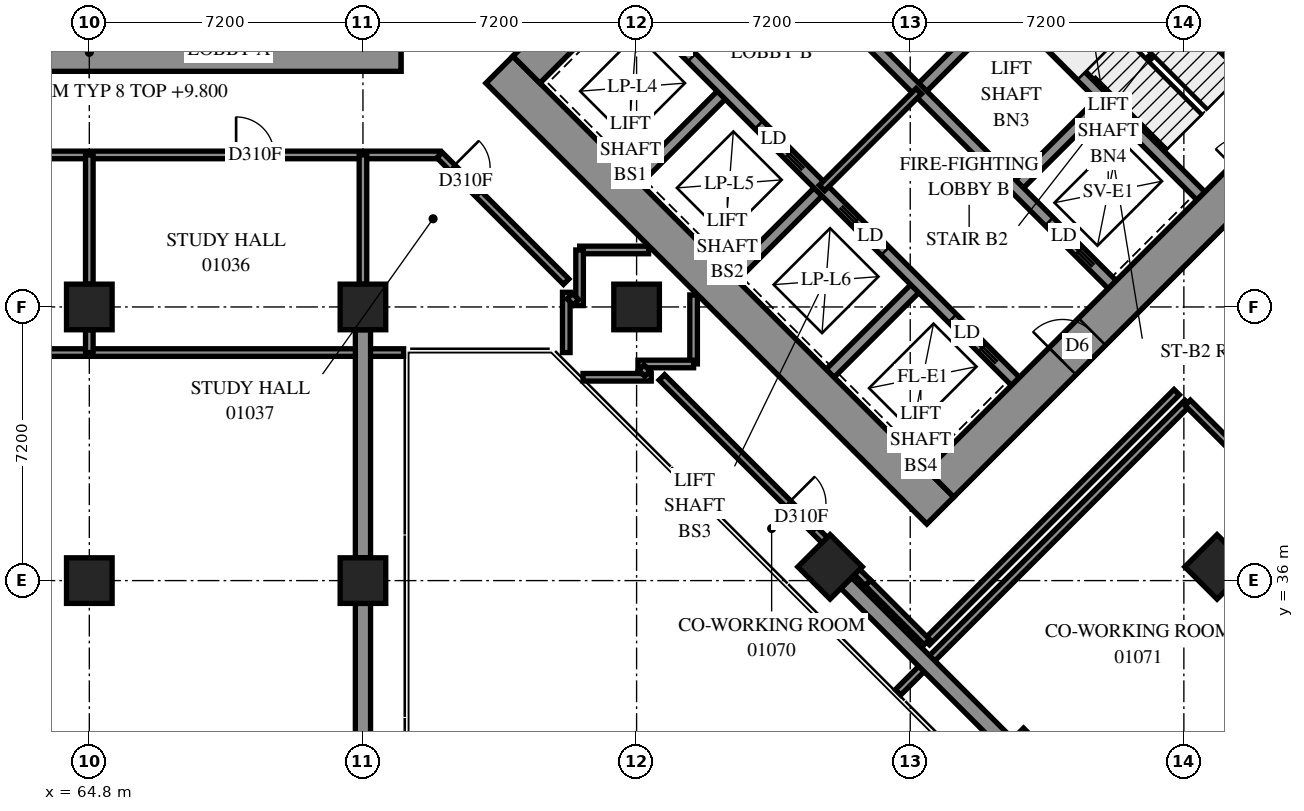
"""IFC4 building model, lengths in metres.
Left out: names, types, materials, properties, quantities, classifications, styles, units other than length and angle.
Written with IfcOpenShell. Run it as: python <this file> out.ifc"""

import sys

from ifc_helpers import new_model, si_unit, direction, frame, frame_2d, origin, origin_2d, place, context, subcontext, project, spatial, rectangle, extrude, element, fill, save


model = new_model("IFC4")
c1 = context("Model", 3, precision=1e-05, world=origin(), true_north=direction((0.0, 1.0)))
c2 = subcontext(c1, "Body", "Model", "MODEL_VIEW")
j1 = project(units=[si_unit("LENGTHUNIT", "METRE"), si_unit("PLANEANGLEUNIT", "RADIAN")], contexts=[c1])
p1 = place(None, origin())
s1 = spatial("IfcSite", under=j1, at=p1, CompositionType="ELEMENT")
p2 = place(p1, origin())
s2 = spatial("IfcBuilding", under=s1, at=p2, CompositionType="ELEMENT")
p3 = place(p2, frame((0.0, 0.0, 6.0)))
s3 = spatial("IfcBuildingStorey", under=s2, at=p3, CompositionType="ELEMENT", Elevation=6.0)
for number, where, z_axis, x_axis in (
    (1, (64.8, 36.0, 0.0), (0.0, 0.0, 1.0), (1.0, 0.0, 0.0)),
    (2, (64.8, 43.2, 0.0), (0.0, 0.0, 1.0), (1.0, 0.0, 0.0)),
    (3, (72.0, 36.0, 0.0), (0.0, 0.0, 1.0), (1.0, 0.0, 0.0)),
    (4, (72.0, 43.2, 0.0), (0.0, 0.0, 1.0), (1.0, 0.0, 0.0)),
    (5, (79.2, 43.2, 0.0), (0.0, 0.0, 1.0), (1.0, 0.0, 0.0)),
    (6, (84.291, 36.362, 0.0), (0.0, 0.0, 1.0), (0.707, -0.707, 0.0)),
    (7, (94.474, 36.362, 0.0), (0.0, 0.0, 1.0), (0.707, -0.707, 0.0)),
    (8, (89.382, 31.271, 0.0), (0.0, 0.0, 1.0), (0.707, -0.707, 0.0)),
):
    element("IfcColumn", number, at=place(p3, frame(where, z_axis=z_axis, x_axis=x_axis)), inside=s3, PredefinedType="COLUMN", context=c2, shape_type="SweptSolid", body=[
        extrude(rectangle(XDim=1.2, YDim=1.2, at=origin_2d()), origin(), (0.0, 0.0, 1.0), 3.8),
    ])
for number, where, z_axis, x_axis in (
    (9, (56.6, 49.9, -0.4), (0.0, 0.0, 1.0), (1.0, 0.0, 0.0)),
    (10, (75.594, 49.443, -0.4), (0.0, 0.0, 1.0), (0.707, -0.707, 0.0)),
):
    element("IfcWall", number, at=place(p3, frame(where, z_axis=z_axis, x_axis=x_axis)), inside=s3, PredefinedType="SHEAR", context=c2, shape_type="SweptSolid", body=[
        extrude(rectangle(XDim=16.4, YDim=1.0, at=frame_2d((8.2, 0.0))), origin(), (0.0, 0.0, 1.0), 3.5),
    ])
p4 = place(p3, frame((86.483, 60.333, -0.4), z_axis=(0.0, 0.0, 1.0), x_axis=(0.70710983, -0.7071037324, 0.0)))
e11 = element("IfcWall", 11, at=p4, inside=s3, PredefinedType="SHEAR", context=c2, shape_type="SweptSolid", body=[
    extrude(rectangle(XDim=16.4, YDim=1.0, at=frame_2d((8.2, 0.0))), origin(), (0.0, 0.0, 1.0), 3.5),
])
p5 = place(p4, frame((11.0, 0.0, 0.4)))
e12 = element("IfcOpeningElement", 12, at=p5, cuts=e11, PredefinedType="OPENING", context=c2, shape_type="SweptSolid", body=[
    extrude(rectangle(XDim=0.8, YDim=2.1, at=frame_2d((0.4, 1.05))), frame((0.0, 0.51, 0.0), z_axis=(0.0, -1.0, 0.0), x_axis=(1.0, 0.0, 0.0)), (0.0, 0.0, 1.0), 1.02),
])
p6 = place(p3, frame((76.301, 49.443, -0.4), z_axis=(0.0, 0.0, 1.0), x_axis=(0.7071067812, 0.7071067812, 0.0)))
e13 = element("IfcWall", 13, at=p6, inside=s3, PredefinedType="SHEAR", context=c2, shape_type="SweptSolid", body=[
    extrude(rectangle(XDim=14.4, YDim=1.0, at=frame_2d((7.2, 0.0))), origin(), (0.0, 0.0, 1.0), 3.5),
])
p7 = place(p6, frame((4.55, 0.0, 0.4)))
e14 = element("IfcOpeningElement", 14, at=p7, cuts=e13, PredefinedType="OPENING", context=c2, shape_type="SweptSolid", body=[
    extrude(rectangle(XDim=1.1, YDim=2.1, at=frame_2d((0.55, 1.05))), frame((0.0, 0.51, 0.0), z_axis=(0.0, -1.0, 0.0), x_axis=(1.0, 0.0, 0.0)), (0.0, 0.0, 1.0), 1.02),
])
p8 = place(p6, frame((11.35, 0.0, 0.4)))
e15 = element("IfcOpeningElement", 15, at=p8, cuts=e13, PredefinedType="OPENING", context=c2, shape_type="SweptSolid", body=[
    extrude(rectangle(XDim=1.1, YDim=2.1, at=frame_2d((0.55, 1.05))), frame((0.0, 0.51, 0.0), z_axis=(0.0, -1.0, 0.0), x_axis=(1.0, 0.0, 0.0)), (0.0, 0.0, 1.0), 1.02),
])
p9 = place(p3, frame((87.19, 38.554, -0.4), z_axis=(0.0, 0.0, 1.0), x_axis=(0.707103309, 0.7071102534, 0.0)))
e16 = element("IfcWall", 16, at=p9, inside=s3, PredefinedType="SHEAR", context=c2, shape_type="SweptSolid", body=[
    extrude(rectangle(XDim=14.4, YDim=1.0, at=frame_2d((7.2, 0.0))), origin(), (0.0, 0.0, 1.0), 3.5),
])
p10 = place(p9, frame((4.55, 0.0, 0.4)))
e17 = element("IfcOpeningElement", 17, at=p10, cuts=e16, PredefinedType="OPENING", context=c2, shape_type="SweptSolid", body=[
    extrude(rectangle(XDim=1.1, YDim=2.1, at=frame_2d((0.55, 1.05))), frame((0.0, 0.51, 0.0), z_axis=(0.0, -1.0, 0.0), x_axis=(1.0, 0.0, 0.0)), (0.0, 0.0, 1.0), 1.02),
])
p11 = place(p9, frame((11.35, 0.0, 0.4)))
e18 = element("IfcOpeningElement", 18, at=p11, cuts=e16, PredefinedType="OPENING", context=c2, shape_type="SweptSolid", body=[
    extrude(rectangle(XDim=1.1, YDim=2.1, at=frame_2d((0.55, 1.05))), frame((0.0, 0.51, 0.0), z_axis=(0.0, -1.0, 0.0), x_axis=(1.0, 0.0, 0.0)), (0.0, 0.0, 1.0), 1.02),
])
p12 = place(p3, frame((79.2, 46.544, 0.0), z_axis=(0.0, 0.0, 1.0), x_axis=(0.7071219326, 0.7070916295, 0.0)))
e19 = element("IfcWall", 19, at=p12, inside=s3, PredefinedType="SOLIDWALL", context=c2, shape_type="SweptSolid", body=[
    extrude(rectangle(XDim=3.3, YDim=0.3, at=frame_2d((1.65, 0.0))), origin(), (0.0, 0.0, 1.0), 3.8),
])
p13 = place(p3, frame((81.746, 43.999, 0.0), z_axis=(0.0, 0.0, 1.0), x_axis=(0.7071067812, 0.7071067812, 0.0)))
e20 = element("IfcWall", 20, at=p13, inside=s3, PredefinedType="SOLIDWALL", context=c2, shape_type="SweptSolid", body=[
    extrude(rectangle(XDim=3.3, YDim=0.3, at=frame_2d((1.65, 0.0))), origin(), (0.0, 0.0, 1.0), 3.8),
])
p14 = place(p3, frame((86.625, 48.878, 0.0), z_axis=(0.0, 0.0, 1.0), x_axis=(0.7071067812, 0.7071067812, 0.0)))
e21 = element("IfcWall", 21, at=p14, inside=s3, PredefinedType="SOLIDWALL", context=c2, shape_type="SweptSolid", body=[
    extrude(rectangle(XDim=3.3, YDim=0.3, at=frame_2d((1.65, 0.0))), origin(), (0.0, 0.0, 1.0), 3.8),
])
p15 = place(p3, frame((84.291, 41.453, 0.0), z_axis=(0.0, 0.0, 1.0), x_axis=(0.7071067812, 0.7071067812, 0.0)))
e22 = element("IfcWall", 22, at=p15, inside=s3, PredefinedType="SOLIDWALL", context=c2, shape_type="SweptSolid", body=[
    extrude(rectangle(XDim=3.3, YDim=0.3, at=frame_2d((1.65, 0.0))), origin(), (0.0, 0.0, 1.0), 3.8),
])
p16 = place(p3, frame((89.17, 46.332, 0.0), z_axis=(0.0, 0.0, 1.0), x_axis=(0.7071067812, 0.7071067812, 0.0)))
e23 = element("IfcWall", 23, at=p16, inside=s3, PredefinedType="SOLIDWALL", context=c2, shape_type="SweptSolid", body=[
    extrude(rectangle(XDim=3.3, YDim=0.3, at=frame_2d((1.65, 0.0))), origin(), (0.0, 0.0, 1.0), 3.8),
])
p17 = place(p3, frame((78.988, 51.423, 0.0), z_axis=(0.0, 0.0, 1.0), x_axis=(0.7071067812, -0.7071067812, 0.0)))
e24 = element("IfcWall", 24, at=p17, inside=s3, PredefinedType="SOLIDWALL", context=c2, shape_type="SweptSolid", body=[
    extrude(rectangle(XDim=14.4, YDim=0.3, at=frame_2d((7.2, 0.0))), origin(), (0.0, 0.0, 1.0), 3.8),
])
p18 = place(p17, frame((1.25, 0.0, 0.0)))
e25 = element("IfcOpeningElement", 25, at=p18, cuts=e24, PredefinedType="OPENING", context=c2, shape_type="SweptSolid", body=[
    extrude(rectangle(XDim=1.1, YDim=2.1, at=frame_2d((0.55, 1.05))), frame((0.0, 0.16, 0.0), z_axis=(0.0, -1.0, 0.0), x_axis=(1.0, 0.0, 0.0)), (0.0, 0.0, 1.0), 0.32),
])
p19 = place(p17, frame((4.85, 0.0, 0.0)))
e26 = element("IfcOpeningElement", 26, at=p19, cuts=e24, PredefinedType="OPENING", context=c2, shape_type="SweptSolid", body=[
    extrude(rectangle(XDim=1.1, YDim=2.1, at=frame_2d((0.55, 1.05))), frame((0.0, 0.16, 0.0), z_axis=(0.0, -1.0, 0.0), x_axis=(1.0, 0.0, 0.0)), (0.0, 0.0, 1.0), 0.32),
])
p20 = place(p17, frame((8.45, 0.0, 0.0)))
e27 = element("IfcOpeningElement", 27, at=p20, cuts=e24, PredefinedType="OPENING", context=c2, shape_type="SweptSolid", body=[
    extrude(rectangle(XDim=1.1, YDim=2.1, at=frame_2d((0.55, 1.05))), frame((0.0, 0.16, 0.0), z_axis=(0.0, -1.0, 0.0), x_axis=(1.0, 0.0, 0.0)), (0.0, 0.0, 1.0), 0.32),
])
p21 = place(p17, frame((12.05, 0.0, 0.0)))
e28 = element("IfcOpeningElement", 28, at=p21, cuts=e24, PredefinedType="OPENING", context=c2, shape_type="SweptSolid", body=[
    extrude(rectangle(XDim=1.1, YDim=2.1, at=frame_2d((0.55, 1.05))), frame((0.0, 0.16, 0.0), z_axis=(0.0, -1.0, 0.0), x_axis=(1.0, 0.0, 0.0)), (0.0, 0.0, 1.0), 0.32),
])
p22 = place(p3, frame((81.534, 53.969, 0.0), z_axis=(0.0, 0.0, 1.0), x_axis=(0.707103309, -0.7071102534, 0.0)))
e29 = element("IfcWall", 29, at=p22, inside=s3, PredefinedType="SOLIDWALL", context=c2, shape_type="SweptSolid", body=[
    extrude(rectangle(XDim=14.4, YDim=0.3, at=frame_2d((7.2, 0.0))), origin(), (0.0, 0.0, 1.0), 3.8),
])
p23 = place(p22, frame((12.05, 0.0, 0.0)))
e30 = element("IfcOpeningElement", 30, at=p23, cuts=e29, PredefinedType="OPENING", context=c2, shape_type="SweptSolid", body=[
    extrude(rectangle(XDim=1.1, YDim=2.1, at=frame_2d((0.55, 1.05))), frame((0.0, 0.16, 0.0), z_axis=(0.0, -1.0, 0.0), x_axis=(1.0, 0.0, 0.0)), (0.0, 0.0, 1.0), 0.32),
])
p24 = place(p3, frame((88.958, 51.211, 0.0), z_axis=(0.0, 0.0, 1.0), x_axis=(0.7070998367, -0.7071137256, 0.0)))
e31 = element("IfcWall", 31, at=p24, inside=s3, PredefinedType="SOLIDWALL", context=c2, shape_type="SweptSolid", body=[
    extrude(rectangle(XDim=7.2, YDim=0.3, at=frame_2d((3.6, 0.0))), origin(), (0.0, 0.0, 1.0), 3.8),
])
p25 = place(p3, frame((91.313, 53.354, 0.0), z_axis=(0.0, 0.0, 1.0), x_axis=(0.7071147811, -0.7070987812, 0.0)))
e32 = element("IfcWall", 32, at=p25, inside=s3, PredefinedType="PARTITIONING", context=c2, shape_type="SweptSolid", body=[
    extrude(rectangle(XDim=6.25, YDim=0.15, at=frame_2d((3.125, 0.0))), origin(), (0.0, 0.0, 1.0), 3.8),
])
p26 = place(p3, frame((84.079, 46.332, 0.0), z_axis=(0.0, 0.0, 1.0), x_axis=(0.7071067812, 0.7071067812, 0.0)))
e33 = element("IfcWall", 33, at=p26, inside=s3, PredefinedType="PARTITIONING", context=c2, shape_type="SweptSolid", body=[
    extrude(rectangle(XDim=3.6, YDim=0.2, at=frame_2d((1.8, 0.0))), origin(), (0.0, 0.0, 1.0), 3.8),
])
p27 = place(p3, frame((13.33, 42.0, 0.0), z_axis=(0.0, 0.0, 1.0), x_axis=(1.0, 0.0, 0.0)))
e34 = element("IfcWall", 34, at=p27, inside=s3, PredefinedType="PARTITIONING", context=c2, shape_type="SweptSolid", body=[
    extrude(rectangle(XDim=59.74, YDim=0.2, at=frame_2d((29.87, 0.0))), origin(), (0.0, 0.0, 1.0), 3.8),
])
p28 = place(p3, frame((54.4, 47.2, 0.0), z_axis=(0.0, 0.0, 1.0), x_axis=(1.0, 0.0, 0.0)))
e35 = element("IfcWall", 35, at=p28, inside=s3, PredefinedType="PARTITIONING", context=c2, shape_type="SweptSolid", body=[
    extrude(rectangle(XDim=19.618, YDim=0.2, at=frame_2d((9.809, 0.0))), origin(), (0.0, 0.0, 1.0), 3.8),
])
p29 = place(p28, frame((0.178, 0.0, 0.0)))
e36 = element("IfcOpeningElement", 36, at=p29, cuts=e35, PredefinedType="OPENING", context=c2, shape_type="SweptSolid", body=[
    extrude(rectangle(XDim=1.0, YDim=2.1, at=frame_2d((0.5, 1.05))), frame((0.0, 0.11, 0.0), z_axis=(0.0, -1.0, 0.0), x_axis=(1.0, 0.0, 0.0)), (0.0, 0.0, 1.0), 0.22),
])
p30 = place(p28, frame((7.062, 0.0, 0.0)))
e37 = element("IfcOpeningElement", 37, at=p30, cuts=e35, PredefinedType="OPENING", context=c2, shape_type="SweptSolid", body=[
    extrude(rectangle(XDim=1.0, YDim=2.1, at=frame_2d((0.5, 1.05))), frame((0.0, 0.11, 0.0), z_axis=(0.0, -1.0, 0.0), x_axis=(1.0, 0.0, 0.0)), (0.0, 0.0, 1.0), 0.22),
])
p31 = place(p28, frame((14.262, 0.0, 0.0)))
e38 = element("IfcOpeningElement", 38, at=p31, cuts=e35, PredefinedType="OPENING", context=c2, shape_type="SweptSolid", body=[
    extrude(rectangle(XDim=1.0, YDim=2.1, at=frame_2d((0.5, 1.05))), frame((0.0, 0.11, 0.0), z_axis=(0.0, -1.0, 0.0), x_axis=(1.0, 0.0, 0.0)), (0.0, 0.0, 1.0), 0.22),
])
for number, where, z_axis, x_axis in (
    (39, (86.079, 33.061, 0.0), (0.0, 0.0, 1.0), (0.707, 0.707, 0.0)),
    (40, (91.17, 27.968, 0.0), (0.0, 0.0, 1.0), (0.707, 0.707, 0.0)),
):
    element("IfcWall", number, at=place(p3, frame(where, z_axis=z_axis, x_axis=x_axis)), inside=s3, PredefinedType="PARTITIONING", context=c2, shape_type="SweptSolid", body=[
        extrude(rectangle(XDim=10.771, YDim=0.2, at=frame_2d((5.385, 0.0))), origin(), (0.0, 0.0, 1.0), 3.8),
    ])
p32 = place(p3, frame((86.836, 34.382, 0.0), z_axis=(0.0, 0.0, 1.0), x_axis=(0.7071067812, 0.7071067812, 0.0)))
e41 = element("IfcWall", 41, at=p32, inside=s3, PredefinedType="PARTITIONING", context=c2, shape_type="SweptSolid", body=[
    extrude(rectangle(XDim=9.3, YDim=0.2, at=frame_2d((4.65, 0.0))), origin(), (0.0, 0.0, 1.0), 3.8),
])
p33 = place(p3, frame((79.865, 41.347, 0.0), z_axis=(0.0, 0.0, 1.0), x_axis=(0.7071067812, -0.7071067812, 0.0)))
e42 = element("IfcWall", 42, at=p33, inside=s3, PredefinedType="PARTITIONING", context=c2, shape_type="SweptSolid", body=[
    extrude(rectangle(XDim=6.206, YDim=0.2, at=frame_2d((3.103, 0.0))), origin(), (0.0, 0.0, 1.0), 3.8),
])
p34 = place(p33, frame((4.692, 0.0, 0.0)))
e43 = element("IfcOpeningElement", 43, at=p34, cuts=e42, PredefinedType="OPENING", context=c2, shape_type="SweptSolid", body=[
    extrude(rectangle(XDim=1.0, YDim=2.1, at=frame_2d((0.5, 1.05))), frame((0.0, 0.11, 0.0), z_axis=(0.0, -1.0, 0.0), x_axis=(1.0, 0.0, 0.0)), (0.0, 0.0, 1.0), 0.22),
])
p35 = place(p3, frame((74.015, 47.197, 0.0), z_axis=(0.0, 0.0, 1.0), x_axis=(0.7071067812, -0.7071067812, 0.0)))
e44 = element("IfcWall", 44, at=p35, inside=s3, PredefinedType="PARTITIONING", context=c2, shape_type="SweptSolid", body=[
    extrude(rectangle(XDim=4.712, YDim=0.2, at=frame_2d((2.356, 0.0))), origin(), (0.0, 0.0, 1.0), 3.8),
])
p36 = place(p35, frame((0.468, 0.0, 0.0)))
e45 = element("IfcOpeningElement", 45, at=p36, cuts=e44, PredefinedType="OPENING", context=c2, shape_type="SweptSolid", body=[
    extrude(rectangle(XDim=1.0, YDim=2.1, at=frame_2d((0.5, 1.05))), frame((0.0, 0.11, 0.0), z_axis=(0.0, -1.0, 0.0), x_axis=(1.0, 0.0, 0.0)), (0.0, 0.0, 1.0), 0.22),
])
p37 = place(p3, frame((93.699, 40.679, 0.0), z_axis=(0.0, 0.0, 1.0), x_axis=(0.7071067812, -0.7071067812, 0.0)))
e46 = element("IfcWall", 46, at=p37, inside=s3, PredefinedType="PARTITIONING", context=c2, shape_type="SweptSolid", body=[
    extrude(rectangle(XDim=3.601, YDim=0.2, at=frame_2d((1.8, 0.0))), origin(), (0.0, 0.0, 1.0), 3.8),
])
p38 = place(p37, frame((2.338, 0.0, 0.0)))
e47 = element("IfcOpeningElement", 47, at=p38, cuts=e46, PredefinedType="OPENING", context=c2, shape_type="SweptSolid", body=[
    extrude(rectangle(XDim=1.0, YDim=2.1, at=frame_2d((0.5, 1.05))), frame((0.0, 0.11, 0.0), z_axis=(0.0, -1.0, 0.0), x_axis=(1.0, 0.0, 0.0)), (0.0, 0.0, 1.0), 0.22),
])
for number, where, z_axis, x_axis in (
    (48, (64.8, 43.8, 0.0), (0.0, 0.0, 1.0), (0.0, 1.0, 0.0)),
    (49, (72.0, 43.8, 0.0), (0.0, 0.0, 1.0), (0.0, 1.0, 0.0)),
):
    element("IfcWall", number, at=place(p3, frame(where, z_axis=z_axis, x_axis=x_axis)), inside=s3, PredefinedType="PARTITIONING", context=c2, shape_type="SweptSolid", body=[
        extrude(rectangle(XDim=3.4, YDim=0.2, at=frame_2d((1.7, 0.0))), origin(), (0.0, 0.0, 1.0), 3.8),
    ])
p39 = place(p3, frame((85.284, 35.94, 0.0), z_axis=(0.0, 0.0, 1.0), x_axis=(0.706651904, -0.7075613659, 0.0)))
e50 = element("IfcWall", 50, at=p39, inside=s3, PredefinedType="PARTITIONING", context=c2, shape_type="SweptSolid", body=[
    extrude(rectangle(XDim=2.199, YDim=0.2, at=frame_2d((1.1, 0.0))), origin(), (0.0, 0.0, 1.0), 3.8),
])
for number, where, z_axis, x_axis in (
    (51, (77.702, 44.7, 0.0), (0.0, 0.0, 1.0), (1.0, 0.0, 0.0)),
    (52, (80.7, 41.702, 0.0), (0.0, 0.0, 1.0), (0.0, 1.0, 0.0)),
):
    element("IfcWall", number, at=place(p3, frame(where, z_axis=z_axis, x_axis=x_axis)), inside=s3, PredefinedType="PARTITIONING", context=c2, shape_type="SweptSolid", body=[
        extrude(rectangle(XDim=1.814, YDim=0.2, at=frame_2d((0.907, 0.0))), origin(), (0.0, 0.0, 1.0), 3.8),
    ])
p40 = place(p3, frame((77.79, 41.35, 0.0), z_axis=(0.0, 0.0, 1.0), x_axis=(1.0, 0.0, 0.0)))
e53 = element("IfcWall", 53, at=p40, inside=s3, PredefinedType="PARTITIONING", context=c2, shape_type="SweptSolid", body=[
    extrude(rectangle(XDim=1.796, YDim=0.2, at=frame_2d((0.898, 0.0))), origin(), (0.0, 0.0, 1.0), 3.8),
])
p41 = place(p3, frame((77.35, 42.0, 0.0), z_axis=(0.0, 0.0, 1.0), x_axis=(0.0, 1.0, 0.0)))
e54 = element("IfcWall", 54, at=p41, inside=s3, PredefinedType="PARTITIONING", context=c2, shape_type="SweptSolid", body=[
    extrude(rectangle(XDim=1.586, YDim=0.2, at=frame_2d((0.793, 0.0))), origin(), (0.0, 0.0, 1.0), 3.8),
])
for number, where, z_axis, x_axis in (
    (55, (77.7, 43.236, 0.0), (0.0, 0.0, 1.0), (0.0, 1.0, 0.0)),
    (56, (79.236, 41.7, 0.0), (0.0, 0.0, 1.0), (1.0, 0.0, 0.0)),
):
    element("IfcWall", number, at=place(p3, frame(where, z_axis=z_axis, x_axis=x_axis)), inside=s3, PredefinedType="PARTITIONING", context=c2, shape_type="SweptSolid", body=[
        extrude(rectangle(XDim=1.464, YDim=0.2, at=frame_2d((0.732, 0.0))), origin(), (0.0, 0.0, 1.0), 3.8),
    ])
p42 = place(p3, frame((64.8, 42.0, 0.0), z_axis=(0.0, 0.0, 1.0), x_axis=(0.0, 1.0, 0.0)))
e57 = element("IfcWall", 57, at=p42, inside=s3, PredefinedType="PARTITIONING", context=c2, shape_type="SweptSolid", body=[
    extrude(rectangle(XDim=0.6, YDim=0.2, at=frame_2d((0.3, 0.0))), origin(), (0.0, 0.0, 1.0), 3.8),
])
p43 = place(p3, frame((72.0, 42.0, 0.0), z_axis=(0.0, 0.0, 1.0), x_axis=(0.0, 1.0, 0.0)))
e58 = element("IfcWall", 58, at=p43, inside=s3, PredefinedType="PARTITIONING", context=c2, shape_type="SweptSolid", body=[
    extrude(rectangle(XDim=0.6, YDim=0.2, at=frame_2d((0.3, 0.0))), origin(), (0.0, 0.0, 1.0), 3.2),
])
p44 = place(p3, frame((84.895, 36.331, 0.0), z_axis=(0.0, 0.0, 1.0), x_axis=(0.7071067812, -0.7071067812, 0.0)))
e59 = element("IfcWall", 59, at=p44, inside=s3, PredefinedType="PARTITIONING", context=c2, shape_type="SweptSolid", body=[
    extrude(rectangle(XDim=0.551, YDim=0.2, at=frame_2d((0.276, 0.0))), origin(), (0.0, 0.0, 1.0), 3.8),
])
for number, where, z_axis, x_axis in (
    (60, (79.325, 41.605, 0.0), (0.0, 0.0, 1.0), (0.707, -0.707, 0.0)),
    (61, (77.446, 43.484, 0.0), (0.0, 0.0, 1.0), (0.707, -0.707, 0.0)),
):
    element("IfcWall", number, at=place(p3, frame(where, z_axis=z_axis, x_axis=x_axis)), inside=s3, PredefinedType="PARTITIONING", context=c2, shape_type="SweptSolid", body=[
        extrude(rectangle(XDim=0.225, YDim=0.2, at=frame_2d((0.113, 0.0))), origin(), (0.0, 0.0, 1.0), 3.8),
    ])
p45 = place(p10, origin())
e62 = element("IfcDoor", 62, at=p45, inside=s3, OperationType="DOUBLE_DOOR_SINGLE_SWING", PredefinedType="DOOR", context=c2, shape_type="SweptSolid", body=[
    extrude(rectangle(XDim=1.1, YDim=2.1, at=frame_2d((0.55, 1.05))), frame((0.0, 0.025, 0.0), z_axis=(0.0, -1.0, 0.0), x_axis=(1.0, 0.0, 0.0)), (0.0, 0.0, 1.0), 0.05),
])
fill(e17, e62)
p46 = place(p18, origin())
e63 = element("IfcDoor", 63, at=p46, inside=s3, OperationType="SLIDING_TO_LEFT", PredefinedType="DOOR", context=c2, shape_type="SweptSolid", body=[
    extrude(rectangle(XDim=1.1, YDim=2.1, at=frame_2d((0.55, 1.05))), frame((0.0, 0.025, 0.0), z_axis=(0.0, -1.0, 0.0), x_axis=(1.0, 0.0, 0.0)), (0.0, 0.0, 1.0), 0.05),
])
fill(e25, e63)
p47 = place(p19, origin())
e64 = element("IfcDoor", 64, at=p47, inside=s3, OperationType="SLIDING_TO_RIGHT", PredefinedType="DOOR", context=c2, shape_type="SweptSolid", body=[
    extrude(rectangle(XDim=1.1, YDim=2.1, at=frame_2d((0.55, 1.05))), frame((0.0, 0.025, 0.0), z_axis=(0.0, -1.0, 0.0), x_axis=(1.0, 0.0, 0.0)), (0.0, 0.0, 1.0), 0.05),
])
fill(e26, e64)
p48 = place(p20, origin())
e65 = element("IfcDoor", 65, at=p48, inside=s3, OperationType="SLIDING_TO_LEFT", PredefinedType="DOOR", context=c2, shape_type="SweptSolid", body=[
    extrude(rectangle(XDim=1.1, YDim=2.1, at=frame_2d((0.55, 1.05))), frame((0.0, 0.025, 0.0), z_axis=(0.0, -1.0, 0.0), x_axis=(1.0, 0.0, 0.0)), (0.0, 0.0, 1.0), 0.05),
])
fill(e27, e65)
p49 = place(p21, origin())
e66 = element("IfcDoor", 66, at=p49, inside=s3, OperationType="SLIDING_TO_RIGHT", PredefinedType="DOOR", context=c2, shape_type="SweptSolid", body=[
    extrude(rectangle(XDim=1.1, YDim=2.1, at=frame_2d((0.55, 1.05))), frame((0.0, 0.025, 0.0), z_axis=(0.0, -1.0, 0.0), x_axis=(1.0, 0.0, 0.0)), (0.0, 0.0, 1.0), 0.05),
])
fill(e28, e66)
p50 = place(p23, origin())
e67 = element("IfcDoor", 67, at=p50, inside=s3, OperationType="SLIDING_TO_RIGHT", PredefinedType="DOOR", context=c2, shape_type="SweptSolid", body=[
    extrude(rectangle(XDim=1.1, YDim=2.1, at=frame_2d((0.55, 1.05))), frame((0.0, 0.025, 0.0), z_axis=(0.0, -1.0, 0.0), x_axis=(1.0, 0.0, 0.0)), (0.0, 0.0, 1.0), 0.05),
])
fill(e30, e67)
p51 = place(p31, origin())
e68 = element("IfcDoor", 68, at=p51, inside=s3, OperationType="SINGLE_SWING_LEFT", PredefinedType="DOOR", context=c2, shape_type="SweptSolid", body=[
    extrude(rectangle(XDim=1.0, YDim=2.1, at=frame_2d((0.5, 1.05))), frame((0.0, 0.025, 0.0), z_axis=(0.0, -1.0, 0.0), x_axis=(1.0, 0.0, 0.0)), (0.0, 0.0, 1.0), 0.05),
])
fill(e38, e68)
p52 = place(p36, origin())
e69 = element("IfcDoor", 69, at=p52, inside=s3, OperationType="SINGLE_SWING_LEFT", PredefinedType="DOOR", context=c2, shape_type="SweptSolid", body=[
    extrude(rectangle(XDim=1.0, YDim=2.1, at=frame_2d((0.5, 1.05))), frame((0.0, 0.025, 0.0), z_axis=(0.0, -1.0, 0.0), x_axis=(1.0, 0.0, 0.0)), (0.0, 0.0, 1.0), 0.05),
])
fill(e45, e69)
p53 = place(p34, origin())
e70 = element("IfcDoor", 70, at=p53, inside=s3, OperationType="SINGLE_SWING_RIGHT", PredefinedType="DOOR", context=c2, shape_type="SweptSolid", body=[
    extrude(rectangle(XDim=1.0, YDim=2.1, at=frame_2d((0.5, 1.05))), frame((0.0, 0.025, 0.0), z_axis=(0.0, -1.0, 0.0), x_axis=(1.0, 0.0, 0.0)), (0.0, 0.0, 1.0), 0.05),
])
fill(e43, e70)
save(model, sys.argv[1])
